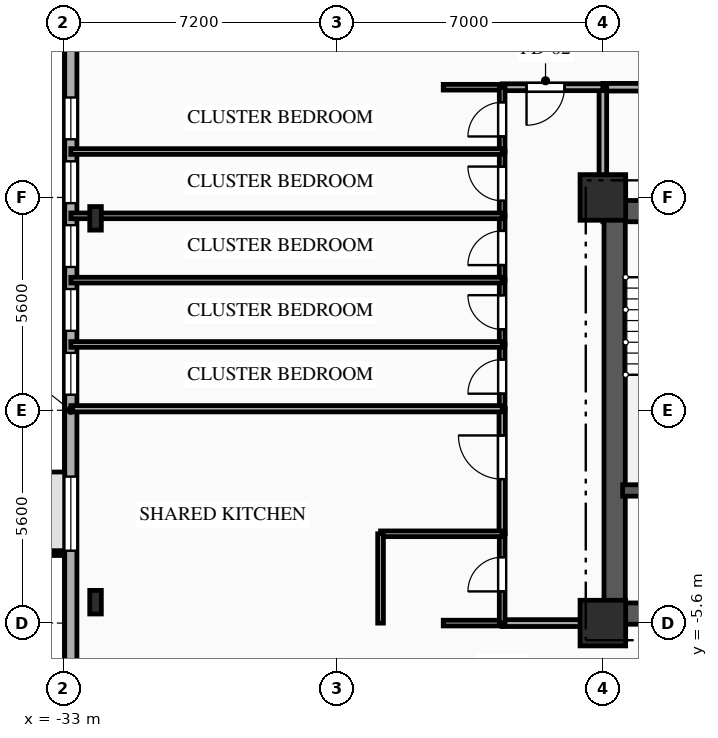
"""IFC4 building model, lengths in metres.
Left out: names, types, materials, properties, quantities, classifications, styles, units other than length and angle.
Written with IfcOpenShell. Run it as: python <this file> out.ifc"""

import sys

from ifc_helpers import new_model, si_unit, direction, frame, frame_2d, origin, origin_2d, place, context, subcontext, project, spatial, rectangle, i_section, extrude, element, fill, save


model = new_model("IFC4")
c1 = context("Model", 3, precision=1e-05, world=origin(), true_north=direction((0.0, 1.0)))
c2 = subcontext(c1, "Body", "Model", "MODEL_VIEW")
j1 = project(units=[si_unit("LENGTHUNIT", "METRE"), si_unit("PLANEANGLEUNIT", "RADIAN")], contexts=[c1])
p1 = place(None, origin())
s1 = spatial("IfcSite", under=j1, at=p1, CompositionType="ELEMENT")
p2 = place(p1, origin())
s2 = spatial("IfcBuilding", under=s1, at=p2, CompositionType="ELEMENT")
p3 = place(p2, frame((0.0, 0.0, 50.45)))
s3 = spatial("IfcBuildingStorey", under=s2, at=p3, CompositionType="ELEMENT", Elevation=50.45)
for number, where, z_axis, x_axis in (
    (1, (-18.8, -5.6, 0.0), (0.0, 0.0, 1.0), (1.0, 0.0, 0.0)),
    (2, (-18.8, 5.6, 0.0), (0.0, 0.0, 1.0), (1.0, 0.0, 0.0)),
):
    element("IfcColumn", number, at=place(p3, frame(where, z_axis=z_axis, x_axis=x_axis)), inside=s3, PredefinedType="COLUMN", context=c2, shape_type="SweptSolid", body=[
        extrude(rectangle(XDim=1.2, YDim=1.2, at=origin_2d()), origin(), (0.0, 0.0, 1.0), 3.35),
    ])
for number, where, z_axis, x_axis in (
    (3, (-32.15, 5.05, 0.0), (0.0, 0.0, 1.0), (1.0, 0.0, 0.0)),
    (4, (-32.15, -5.05, 0.0), (0.0, 0.0, 1.0), (1.0, 0.0, 0.0)),
):
    element("IfcColumn", number, at=place(p3, frame(where, z_axis=z_axis, x_axis=x_axis)), inside=s3, PredefinedType="COLUMN", context=c2, shape_type="SweptSolid", body=[
        extrude(i_section(OverallWidth=0.305, OverallDepth=0.62, WebThickness=0.021, FlangeThickness=0.04, FilletRadius=0.027, at=origin_2d()), origin(), (0.0, 0.0, 1.0), 3.35),
    ])
p4 = place(p3, frame((-32.8, -15.8, 0.0), z_axis=(0.0, 0.0, 1.0), x_axis=(0.0, 1.0, 0.0)))
e5 = element("IfcWall", 5, at=p4, inside=s3, PredefinedType="SOLIDWALL", context=c2, shape_type="SweptSolid", body=[
    extrude(rectangle(XDim=31.6, YDim=0.32, at=frame_2d((15.8, 0.0))), origin(), (0.0, 0.0, 1.0), 3.035),
])
p5 = place(p4, frame((12.105, 0.0, 0.85)))
e6 = element("IfcOpeningElement", 6, at=p5, cuts=e5, PredefinedType="OPENING", context=c2, shape_type="SweptSolid", body=[
    extrude(rectangle(XDim=1.95, YDim=1.85, at=frame_2d((0.975, 0.925))), frame((0.0, 0.17, 0.0), z_axis=(0.0, -1.0, 0.0), x_axis=(1.0, 0.0, 0.0)), (0.0, 0.0, 1.0), 0.34),
])
p6 = place(p4, frame((16.21, 0.0, 0.85)))
e7 = element("IfcOpeningElement", 7, at=p6, cuts=e5, PredefinedType="OPENING", context=c2, shape_type="SweptSolid", body=[
    extrude(rectangle(XDim=1.1, YDim=1.85, at=frame_2d((0.55, 0.925))), frame((0.0, 0.17, 0.0), z_axis=(0.0, -1.0, 0.0), x_axis=(1.0, 0.0, 0.0)), (0.0, 0.0, 1.0), 0.34),
])
p7 = place(p4, frame((17.89, 0.0, 0.85)))
e8 = element("IfcOpeningElement", 8, at=p7, cuts=e5, PredefinedType="OPENING", context=c2, shape_type="SweptSolid", body=[
    extrude(rectangle(XDim=1.1, YDim=1.85, at=frame_2d((0.55, 0.925))), frame((0.0, 0.17, 0.0), z_axis=(0.0, -1.0, 0.0), x_axis=(1.0, 0.0, 0.0)), (0.0, 0.0, 1.0), 0.34),
])
p8 = place(p4, frame((19.57, 0.0, 0.85)))
e9 = element("IfcOpeningElement", 9, at=p8, cuts=e5, PredefinedType="OPENING", context=c2, shape_type="SweptSolid", body=[
    extrude(rectangle(XDim=1.1, YDim=1.85, at=frame_2d((0.55, 0.925))), frame((0.0, 0.17, 0.0), z_axis=(0.0, -1.0, 0.0), x_axis=(1.0, 0.0, 0.0)), (0.0, 0.0, 1.0), 0.34),
])
p9 = place(p4, frame((21.25, 0.0, 0.85)))
e10 = element("IfcOpeningElement", 10, at=p9, cuts=e5, PredefinedType="OPENING", context=c2, shape_type="SweptSolid", body=[
    extrude(rectangle(XDim=1.1, YDim=1.85, at=frame_2d((0.55, 0.925))), frame((0.0, 0.17, 0.0), z_axis=(0.0, -1.0, 0.0), x_axis=(1.0, 0.0, 0.0)), (0.0, 0.0, 1.0), 0.34),
])
p10 = place(p4, frame((22.93, 0.0, 0.85)))
e11 = element("IfcOpeningElement", 11, at=p10, cuts=e5, PredefinedType="OPENING", context=c2, shape_type="SweptSolid", body=[
    extrude(rectangle(XDim=1.1, YDim=1.85, at=frame_2d((0.55, 0.925))), frame((0.0, 0.17, 0.0), z_axis=(0.0, -1.0, 0.0), x_axis=(1.0, 0.0, 0.0)), (0.0, 0.0, 1.0), 0.34),
])
p11 = place(p3, frame((-18.8, 5.24, 0.0), z_axis=(0.0, 0.0, 1.0), x_axis=(1.0, 0.0, 0.0)))
e12 = element("IfcWall", 12, at=p11, inside=s3, PredefinedType="SHEAR", context=c2, shape_type="SweptSolid", body=[
    extrude(rectangle(XDim=9.6, YDim=0.56, at=frame_2d((4.8, 0.0))), origin(), (0.0, 0.0, 1.0), 3.035),
])
p12 = place(p11, frame((1.55, 0.0, 0.0)))
e13 = element("IfcOpeningElement", 13, at=p12, cuts=e12, PredefinedType="OPENING", context=c2, shape_type="SweptSolid", body=[
    extrude(rectangle(XDim=1.1, YDim=2.15, at=frame_2d((0.55, 1.075))), frame((0.0, 0.29, 0.0), z_axis=(0.0, -1.0, 0.0), x_axis=(1.0, 0.0, 0.0)), (0.0, 0.0, 1.0), 0.58),
])
p13 = place(p11, frame((4.775, 0.0, 0.0)))
e14 = element("IfcOpeningElement", 14, at=p13, cuts=e12, PredefinedType="OPENING", context=c2, shape_type="SweptSolid", body=[
    extrude(rectangle(XDim=1.05, YDim=2.1, at=frame_2d((0.525, 1.05))), frame((0.0, 0.29, 0.0), z_axis=(0.0, -1.0, 0.0), x_axis=(1.0, 0.0, 0.0)), (0.0, 0.0, 1.0), 0.58),
])
p14 = place(p3, frame((-18.8, -5.35, 0.0), z_axis=(0.0, 0.0, 1.0), x_axis=(1.0, 0.0, 0.0)))
e15 = element("IfcWall", 15, at=p14, inside=s3, PredefinedType="SHEAR", context=c2, shape_type="SweptSolid", body=[
    extrude(rectangle(XDim=9.6, YDim=0.56, at=frame_2d((4.8, 0.0))), origin(), (0.0, 0.0, 1.0), 3.035),
])
p15 = place(p14, frame((1.05, 0.0, 0.0)))
e16 = element("IfcOpeningElement", 16, at=p15, cuts=e15, PredefinedType="OPENING", context=c2, shape_type="SweptSolid", body=[
    extrude(rectangle(XDim=0.9, YDim=2.1, at=frame_2d((0.45, 1.05))), frame((0.0, 0.29, 0.0), z_axis=(0.0, -1.0, 0.0), x_axis=(1.0, 0.0, 0.0)), (0.0, 0.0, 1.0), 0.58),
])
p16 = place(p3, frame((-18.49, -5.05, 0.0), z_axis=(0.0, 0.0, 1.0), x_axis=(0.0, 1.0, 0.0)))
e17 = element("IfcWall", 17, at=p16, inside=s3, PredefinedType="SHEAR", context=c2, shape_type="SweptSolid", body=[
    extrude(rectangle(XDim=10.1, YDim=0.56, at=frame_2d((5.05, 0.0))), origin(), (0.0, 0.0, 1.0), 3.035),
])
p17 = place(p3, frame((-18.28, -2.11, 0.0), z_axis=(0.0, 0.0, 1.0), x_axis=(1.0, 0.0, 0.0)))
e18 = element("IfcWall", 18, at=p17, inside=s3, PredefinedType="SHEAR", context=c2, shape_type="SweptSolid", body=[
    extrude(rectangle(XDim=3.18, YDim=0.3, at=frame_2d((1.59, 0.0))), origin(), (0.0, 0.0, 1.0), 3.035),
])
p18 = place(p3, frame((-12.0, 8.5, 0.0), z_axis=(0.0, 0.0, 1.0), x_axis=(-1.0, 0.0, 0.0)))
e19 = element("IfcWall", 19, at=p18, inside=s3, PredefinedType="PARTITIONING", context=c2, shape_type="SweptSolid", body=[
    extrude(rectangle(XDim=6.8, YDim=0.2, at=frame_2d((3.4, 0.0))), origin(), (0.0, 0.0, 1.0), 3.035),
])
p19 = place(p18, frame((1.715, 0.0, 0.0)))
e20 = element("IfcOpeningElement", 20, at=p19, cuts=e19, PredefinedType="OPENING", context=c2, shape_type="SweptSolid", body=[
    extrude(rectangle(XDim=1.1, YDim=2.15, at=frame_2d((0.55, 1.075))), frame((0.0, 0.11, 0.0), z_axis=(0.0, -1.0, 0.0), x_axis=(1.0, 0.0, 0.0)), (0.0, 0.0, 1.0), 0.22),
])
p20 = place(p3, frame((-18.8, 8.5, 0.0), z_axis=(0.0, 0.0, 1.0), x_axis=(0.0, -1.0, 0.0)))
e21 = element("IfcWall", 21, at=p20, inside=s3, PredefinedType="PARTITIONING", context=c2, shape_type="SweptSolid", body=[
    extrude(rectangle(XDim=2.9, YDim=0.2, at=frame_2d((1.45, 0.0))), origin(), (0.0, 0.0, 1.0), 2.52),
])
p21 = place(p3, frame((-18.8, 8.5, 0.0), z_axis=(0.0, 0.0, 1.0), x_axis=(-1.0, 0.0, 0.0)))
e22 = element("IfcWall", 22, at=p21, inside=s3, PredefinedType="PARTITIONING", context=c2, shape_type="SweptSolid", body=[
    extrude(rectangle(XDim=2.65, YDim=0.18, at=frame_2d((1.325, 0.0))), origin(), (0.0, 0.0, 1.0), 3.035),
])
p22 = place(p21, frame((1.009, 0.0, 0.0)))
e23 = element("IfcOpeningElement", 23, at=p22, cuts=e22, PredefinedType="OPENING", context=c2, shape_type="SweptSolid", body=[
    extrude(rectangle(XDim=1.0, YDim=2.15, at=frame_2d((0.5, 1.075))), frame((0.0, 0.1, 0.0), z_axis=(0.0, -1.0, 0.0), x_axis=(1.0, 0.0, 0.0)), (0.0, 0.0, 1.0), 0.2),
])
p23 = place(p3, frame((-21.45, 8.5, 0.0), z_axis=(0.0, 0.0, 1.0), x_axis=(-1.0, 0.0, 0.0)))
e24 = element("IfcWall", 24, at=p23, inside=s3, PredefinedType="PARTITIONING", context=c2, shape_type="SweptSolid", body=[
    extrude(rectangle(XDim=1.55, YDim=0.15, at=frame_2d((0.775, 0.0))), origin(), (0.0, 0.0, 1.0), 3.035),
])
p24 = place(p3, frame((-21.45, -5.6, 0.0), z_axis=(0.0, 0.0, 1.0), x_axis=(1.0, 0.0, 0.0)))
e25 = element("IfcWall", 25, at=p24, inside=s3, PredefinedType="PARTITIONING", context=c2, shape_type="SweptSolid", body=[
    extrude(rectangle(XDim=2.65, YDim=0.18, at=frame_2d((1.325, 0.0))), origin(), (0.0, 0.0, 1.0), 3.035),
])
p25 = place(p3, frame((-23.0, -5.6, 0.0), z_axis=(0.0, 0.0, 1.0), x_axis=(1.0, 0.0, 0.0)))
e26 = element("IfcWall", 26, at=p25, inside=s3, PredefinedType="PLUMBINGWALL", context=c2, shape_type="SweptSolid", body=[
    extrude(rectangle(XDim=1.55, YDim=0.15, at=frame_2d((0.775, 0.0))), origin(), (0.0, 0.0, 1.0), 3.035),
])
p26 = place(p3, frame((-21.45, -5.6, 0.0), z_axis=(0.0, 0.0, 1.0), x_axis=(0.0, 1.0, 0.0)))
e27 = element("IfcWall", 27, at=p26, inside=s3, PredefinedType="PLUMBINGWALL", context=c2, shape_type="SweptSolid", body=[
    extrude(rectangle(XDim=2.35, YDim=0.15, at=frame_2d((1.175, 0.0))), origin(), (0.0, 0.0, 1.0), 3.035),
])
p27 = place(p26, frame((0.834, 0.0, 0.0)))
e28 = element("IfcOpeningElement", 28, at=p27, cuts=e27, PredefinedType="OPENING", context=c2, shape_type="SweptSolid", body=[
    extrude(rectangle(XDim=0.9, YDim=2.1, at=frame_2d((0.45, 1.05))), frame((0.0, 0.085, 0.0), z_axis=(0.0, -1.0, 0.0), x_axis=(1.0, 0.0, 0.0)), (0.0, 0.0, 1.0), 0.17),
])
p28 = place(p3, frame((-21.45, -3.25, 0.0), z_axis=(0.0, 0.0, 1.0), x_axis=(0.0, 1.0, 0.0)))
e29 = element("IfcWall", 29, at=p28, inside=s3, PredefinedType="PARTITIONING", context=c2, shape_type="SweptSolid", body=[
    extrude(rectangle(XDim=3.29, YDim=0.165, at=frame_2d((1.645, 0.0))), origin(), (0.0, 0.0, 1.0), 3.035),
])
p29 = place(p28, frame((1.438, 0.0, 0.0)))
e30 = element("IfcOpeningElement", 30, at=p29, cuts=e29, PredefinedType="OPENING", context=c2, shape_type="SweptSolid", body=[
    extrude(rectangle(XDim=1.15, YDim=2.15, at=frame_2d((0.575, 1.075))), frame((0.0, 0.093, 0.0), z_axis=(0.0, -1.0, 0.0), x_axis=(1.0, 0.0, 0.0)), (0.0, 0.0, 1.0), 0.185),
])
p30 = place(p3, frame((-21.45, 0.04, 0.0), z_axis=(0.0, 0.0, 1.0), x_axis=(0.0, 1.0, 0.0)))
e31 = element("IfcWall", 31, at=p30, inside=s3, PredefinedType="PARTITIONING", context=c2, shape_type="SweptSolid", body=[
    extrude(rectangle(XDim=1.692, YDim=0.15, at=frame_2d((0.846, 0.0))), origin(), (0.0, 0.0, 1.0), 3.035),
])
p31 = place(p30, frame((0.396, 0.0, 0.0)))
e32 = element("IfcOpeningElement", 32, at=p31, cuts=e31, PredefinedType="OPENING", context=c2, shape_type="SweptSolid", body=[
    extrude(rectangle(XDim=0.9, YDim=2.1, at=frame_2d((0.45, 1.05))), frame((0.0, 0.085, 0.0), z_axis=(0.0, -1.0, 0.0), x_axis=(1.0, 0.0, 0.0)), (0.0, 0.0, 1.0), 0.17),
])
p32 = place(p3, frame((-21.45, 1.732, 0.0), z_axis=(0.0, 0.0, 1.0), x_axis=(0.0, 1.0, 0.0)))
e33 = element("IfcWall", 33, at=p32, inside=s3, PredefinedType="PARTITIONING", context=c2, shape_type="SweptSolid", body=[
    extrude(rectangle(XDim=1.692, YDim=0.15, at=frame_2d((0.846, 0.0))), origin(), (0.0, 0.0, 1.0), 3.035),
])
p33 = place(p32, frame((0.396, 0.0, 0.0)))
e34 = element("IfcOpeningElement", 34, at=p33, cuts=e33, PredefinedType="OPENING", context=c2, shape_type="SweptSolid", body=[
    extrude(rectangle(XDim=0.9, YDim=2.1, at=frame_2d((0.45, 1.05))), frame((0.0, 0.085, 0.0), z_axis=(0.0, -1.0, 0.0), x_axis=(1.0, 0.0, 0.0)), (0.0, 0.0, 1.0), 0.17),
])
p34 = place(p3, frame((-21.45, 3.424, 0.0), z_axis=(0.0, 0.0, 1.0), x_axis=(0.0, 1.0, 0.0)))
e35 = element("IfcWall", 35, at=p34, inside=s3, PredefinedType="PARTITIONING", context=c2, shape_type="SweptSolid", body=[
    extrude(rectangle(XDim=1.692, YDim=0.15, at=frame_2d((0.846, 0.0))), origin(), (0.0, 0.0, 1.0), 3.035),
])
p35 = place(p34, frame((0.396, 0.0, 0.0)))
e36 = element("IfcOpeningElement", 36, at=p35, cuts=e35, PredefinedType="OPENING", context=c2, shape_type="SweptSolid", body=[
    extrude(rectangle(XDim=0.9, YDim=2.1, at=frame_2d((0.45, 1.05))), frame((0.0, 0.085, 0.0), z_axis=(0.0, -1.0, 0.0), x_axis=(1.0, 0.0, 0.0)), (0.0, 0.0, 1.0), 0.17),
])
p36 = place(p3, frame((-21.45, 5.116, 0.0), z_axis=(0.0, 0.0, 1.0), x_axis=(0.0, 1.0, 0.0)))
e37 = element("IfcWall", 37, at=p36, inside=s3, PredefinedType="PARTITIONING", context=c2, shape_type="SweptSolid", body=[
    extrude(rectangle(XDim=1.692, YDim=0.15, at=frame_2d((0.846, 0.0))), origin(), (0.0, 0.0, 1.0), 3.035),
])
p37 = place(p36, frame((0.396, 0.0, 0.0)))
e38 = element("IfcOpeningElement", 38, at=p37, cuts=e37, PredefinedType="OPENING", context=c2, shape_type="SweptSolid", body=[
    extrude(rectangle(XDim=0.9, YDim=2.1, at=frame_2d((0.45, 1.05))), frame((0.0, 0.085, 0.0), z_axis=(0.0, -1.0, 0.0), x_axis=(1.0, 0.0, 0.0)), (0.0, 0.0, 1.0), 0.17),
])
p38 = place(p3, frame((-21.45, 6.808, 0.0), z_axis=(0.0, 0.0, 1.0), x_axis=(0.0, 1.0, 0.0)))
e39 = element("IfcWall", 39, at=p38, inside=s3, PredefinedType="PARTITIONING", context=c2, shape_type="SweptSolid", body=[
    extrude(rectangle(XDim=1.692, YDim=0.15, at=frame_2d((0.846, 0.0))), origin(), (0.0, 0.0, 1.0), 3.035),
])
p39 = place(p38, frame((0.396, 0.0, 0.0)))
e40 = element("IfcOpeningElement", 40, at=p39, cuts=e39, PredefinedType="OPENING", context=c2, shape_type="SweptSolid", body=[
    extrude(rectangle(XDim=0.9, YDim=2.1, at=frame_2d((0.45, 1.05))), frame((0.0, 0.085, 0.0), z_axis=(0.0, -1.0, 0.0), x_axis=(1.0, 0.0, 0.0)), (0.0, 0.0, 1.0), 0.17),
])
p40 = place(p3, frame((-24.65, -3.25, 0.0), z_axis=(0.0, 0.0, 1.0), x_axis=(1.0, 0.0, 0.0)))
e41 = element("IfcWall", 41, at=p40, inside=s3, PredefinedType="PLUMBINGWALL", context=c2, shape_type="SweptSolid", body=[
    extrude(rectangle(XDim=3.2, YDim=0.15, at=frame_2d((1.6, 0.0))), origin(), (0.0, 0.0, 1.0), 2.52),
])
p41 = place(p3, frame((-24.65, -5.6, 0.0), z_axis=(0.0, 0.0, 1.0), x_axis=(0.0, 1.0, 0.0)))
e42 = element("IfcWall", 42, at=p41, inside=s3, PredefinedType="PLUMBINGWALL", context=c2, shape_type="SweptSolid", body=[
    extrude(rectangle(XDim=2.35, YDim=0.15, at=frame_2d((1.175, 0.0))), origin(), (0.0, 0.0, 1.0), 3.035),
])
p42 = place(p3, frame((-32.8, 0.04, 0.0), z_axis=(0.0, 0.0, 1.0), x_axis=(1.0, 0.0, 0.0)))
e43 = element("IfcWall", 43, at=p42, inside=s3, PredefinedType="PARTITIONING", context=c2, shape_type="SweptSolid", body=[
    extrude(rectangle(XDim=11.35, YDim=0.165, at=frame_2d((5.675, 0.0))), origin(), (0.0, 0.0, 1.0), 3.035),
])
p43 = place(p3, frame((-32.8, 1.732, 0.0), z_axis=(0.0, 0.0, 1.0), x_axis=(1.0, 0.0, 0.0)))
e44 = element("IfcWall", 44, at=p43, inside=s3, PredefinedType="PARTITIONING", context=c2, shape_type="SweptSolid", body=[
    extrude(rectangle(XDim=11.35, YDim=0.15, at=frame_2d((5.675, 0.0))), origin(), (0.0, 0.0, 1.0), 3.035),
])
for number, where, z_axis, x_axis in (
    (45, (-32.8, 3.424, 0.0), (0.0, 0.0, 1.0), (1.0, 0.0, 0.0)),
    (46, (-32.8, 5.116, 0.0), (0.0, 0.0, 1.0), (1.0, 0.0, 0.0)),
):
    element("IfcWall", number, at=place(p3, frame(where, z_axis=z_axis, x_axis=x_axis)), inside=s3, PredefinedType="PARTITIONING", context=c2, shape_type="SweptSolid", body=[
        extrude(rectangle(XDim=11.35, YDim=0.15, at=frame_2d((5.675, 0.0))), origin(), (0.0, 0.0, 1.0), 2.52),
    ])
p44 = place(p3, frame((-32.8, 6.808, 0.0), z_axis=(0.0, 0.0, 1.0), x_axis=(1.0, 0.0, 0.0)))
e47 = element("IfcWall", 47, at=p44, inside=s3, PredefinedType="PARTITIONING", context=c2, shape_type="SweptSolid", body=[
    extrude(rectangle(XDim=11.35, YDim=0.15, at=frame_2d((5.675, 0.0))), origin(), (0.0, 0.0, 1.0), 3.035),
])
p45 = place(p5, origin())
e48 = element("IfcWindow", 48, at=p45, inside=s3, PartitioningType="SINGLE_PANEL", PredefinedType="WINDOW", context=c2, shape_type="SweptSolid", body=[
    extrude(rectangle(XDim=1.95, YDim=1.85, at=frame_2d((0.975, 0.925))), frame((0.0, 0.03, 0.0), z_axis=(0.0, -1.0, 0.0), x_axis=(1.0, 0.0, 0.0)), (0.0, 0.0, 1.0), 0.06),
])
fill(e6, e48)
p46 = place(p6, origin())
e49 = element("IfcWindow", 49, at=p46, inside=s3, PartitioningType="SINGLE_PANEL", PredefinedType="WINDOW", context=c2, shape_type="SweptSolid", body=[
    extrude(rectangle(XDim=1.1, YDim=1.85, at=frame_2d((0.55, 0.925))), frame((0.0, 0.03, 0.0), z_axis=(0.0, -1.0, 0.0), x_axis=(1.0, 0.0, 0.0)), (0.0, 0.0, 1.0), 0.06),
])
fill(e7, e49)
p47 = place(p7, origin())
e50 = element("IfcWindow", 50, at=p47, inside=s3, PartitioningType="SINGLE_PANEL", PredefinedType="WINDOW", context=c2, shape_type="SweptSolid", body=[
    extrude(rectangle(XDim=1.1, YDim=1.85, at=frame_2d((0.55, 0.925))), frame((0.0, 0.03, 0.0), z_axis=(0.0, -1.0, 0.0), x_axis=(1.0, 0.0, 0.0)), (0.0, 0.0, 1.0), 0.06),
])
fill(e8, e50)
p48 = place(p8, origin())
e51 = element("IfcWindow", 51, at=p48, inside=s3, PartitioningType="SINGLE_PANEL", PredefinedType="WINDOW", context=c2, shape_type="SweptSolid", body=[
    extrude(rectangle(XDim=1.1, YDim=1.85, at=frame_2d((0.55, 0.925))), frame((0.0, 0.03, 0.0), z_axis=(0.0, -1.0, 0.0), x_axis=(1.0, 0.0, 0.0)), (0.0, 0.0, 1.0), 0.06),
])
fill(e9, e51)
p49 = place(p9, origin())
e52 = element("IfcWindow", 52, at=p49, inside=s3, PartitioningType="SINGLE_PANEL", PredefinedType="WINDOW", context=c2, shape_type="SweptSolid", body=[
    extrude(rectangle(XDim=1.1, YDim=1.85, at=frame_2d((0.55, 0.925))), frame((0.0, 0.03, 0.0), z_axis=(0.0, -1.0, 0.0), x_axis=(1.0, 0.0, 0.0)), (0.0, 0.0, 1.0), 0.06),
])
fill(e10, e52)
p50 = place(p10, origin())
e53 = element("IfcWindow", 53, at=p50, inside=s3, PartitioningType="SINGLE_PANEL", PredefinedType="WINDOW", context=c2, shape_type="SweptSolid", body=[
    extrude(rectangle(XDim=1.1, YDim=1.85, at=frame_2d((0.55, 0.925))), frame((0.0, 0.03, 0.0), z_axis=(0.0, -1.0, 0.0), x_axis=(1.0, 0.0, 0.0)), (0.0, 0.0, 1.0), 0.06),
])
fill(e11, e53)
p51 = place(p22, origin())
e54 = element("IfcDoor", 54, at=p51, inside=s3, OperationType="SINGLE_SWING_RIGHT", PredefinedType="DOOR", context=c2, shape_type="SweptSolid", body=[
    extrude(rectangle(XDim=1.0, YDim=2.15, at=frame_2d((0.5, 1.075))), frame((0.0, 0.025, 0.0), z_axis=(0.0, -1.0, 0.0), x_axis=(1.0, 0.0, 0.0)), (0.0, 0.0, 1.0), 0.05),
])
fill(e23, e54)
p52 = place(p27, origin())
e55 = element("IfcDoor", 55, at=p52, inside=s3, OperationType="SINGLE_SWING_LEFT", PredefinedType="DOOR", context=c2, shape_type="SweptSolid", body=[
    extrude(rectangle(XDim=0.9, YDim=2.1, at=frame_2d((0.45, 1.05))), frame((0.0, 0.025, 0.0), z_axis=(0.0, -1.0, 0.0), x_axis=(1.0, 0.0, 0.0)), (0.0, 0.0, 1.0), 0.05),
])
fill(e28, e55)
p53 = place(p29, origin())
e56 = element("IfcDoor", 56, at=p53, inside=s3, OperationType="SINGLE_SWING_RIGHT", PredefinedType="DOOR", context=c2, shape_type="SweptSolid", body=[
    extrude(rectangle(XDim=1.15, YDim=2.15, at=frame_2d((0.575, 1.075))), frame((0.0, 0.025, 0.0), z_axis=(0.0, -1.0, 0.0), x_axis=(1.0, 0.0, 0.0)), (0.0, 0.0, 1.0), 0.05),
])
fill(e30, e56)
p54 = place(p31, origin())
e57 = element("IfcDoor", 57, at=p54, inside=s3, OperationType="SINGLE_SWING_LEFT", PredefinedType="DOOR", context=c2, shape_type="SweptSolid", body=[
    extrude(rectangle(XDim=0.9, YDim=2.1, at=frame_2d((0.45, 1.05))), frame((0.0, 0.025, 0.0), z_axis=(0.0, -1.0, 0.0), x_axis=(1.0, 0.0, 0.0)), (0.0, 0.0, 1.0), 0.05),
])
fill(e32, e57)
p55 = place(p33, origin())
e58 = element("IfcDoor", 58, at=p55, inside=s3, OperationType="SINGLE_SWING_RIGHT", PredefinedType="DOOR", context=c2, shape_type="SweptSolid", body=[
    extrude(rectangle(XDim=0.9, YDim=2.1, at=frame_2d((0.45, 1.05))), frame((0.0, 0.025, 0.0), z_axis=(0.0, -1.0, 0.0), x_axis=(1.0, 0.0, 0.0)), (0.0, 0.0, 1.0), 0.05),
])
fill(e34, e58)
p56 = place(p35, origin())
e59 = element("IfcDoor", 59, at=p56, inside=s3, OperationType="SINGLE_SWING_LEFT", PredefinedType="DOOR", context=c2, shape_type="SweptSolid", body=[
    extrude(rectangle(XDim=0.9, YDim=2.1, at=frame_2d((0.45, 1.05))), frame((0.0, 0.025, 0.0), z_axis=(0.0, -1.0, 0.0), x_axis=(1.0, 0.0, 0.0)), (0.0, 0.0, 1.0), 0.05),
])
fill(e36, e59)
p57 = place(p37, origin())
e60 = element("IfcDoor", 60, at=p57, inside=s3, OperationType="SINGLE_SWING_RIGHT", PredefinedType="DOOR", context=c2, shape_type="SweptSolid", body=[
    extrude(rectangle(XDim=0.9, YDim=2.1, at=frame_2d((0.45, 1.05))), frame((0.0, 0.025, 0.0), z_axis=(0.0, -1.0, 0.0), x_axis=(1.0, 0.0, 0.0)), (0.0, 0.0, 1.0), 0.05),
])
fill(e38, e60)
p58 = place(p39, origin())
e61 = element("IfcDoor", 61, at=p58, inside=s3, OperationType="SINGLE_SWING_LEFT", PredefinedType="DOOR", context=c2, shape_type="SweptSolid", body=[
    extrude(rectangle(XDim=0.9, YDim=2.1, at=frame_2d((0.45, 1.05))), frame((0.0, 0.025, 0.0), z_axis=(0.0, -1.0, 0.0), x_axis=(1.0, 0.0, 0.0)), (0.0, 0.0, 1.0), 0.05),
])
fill(e40, e61)
save(model, sys.argv[1])
